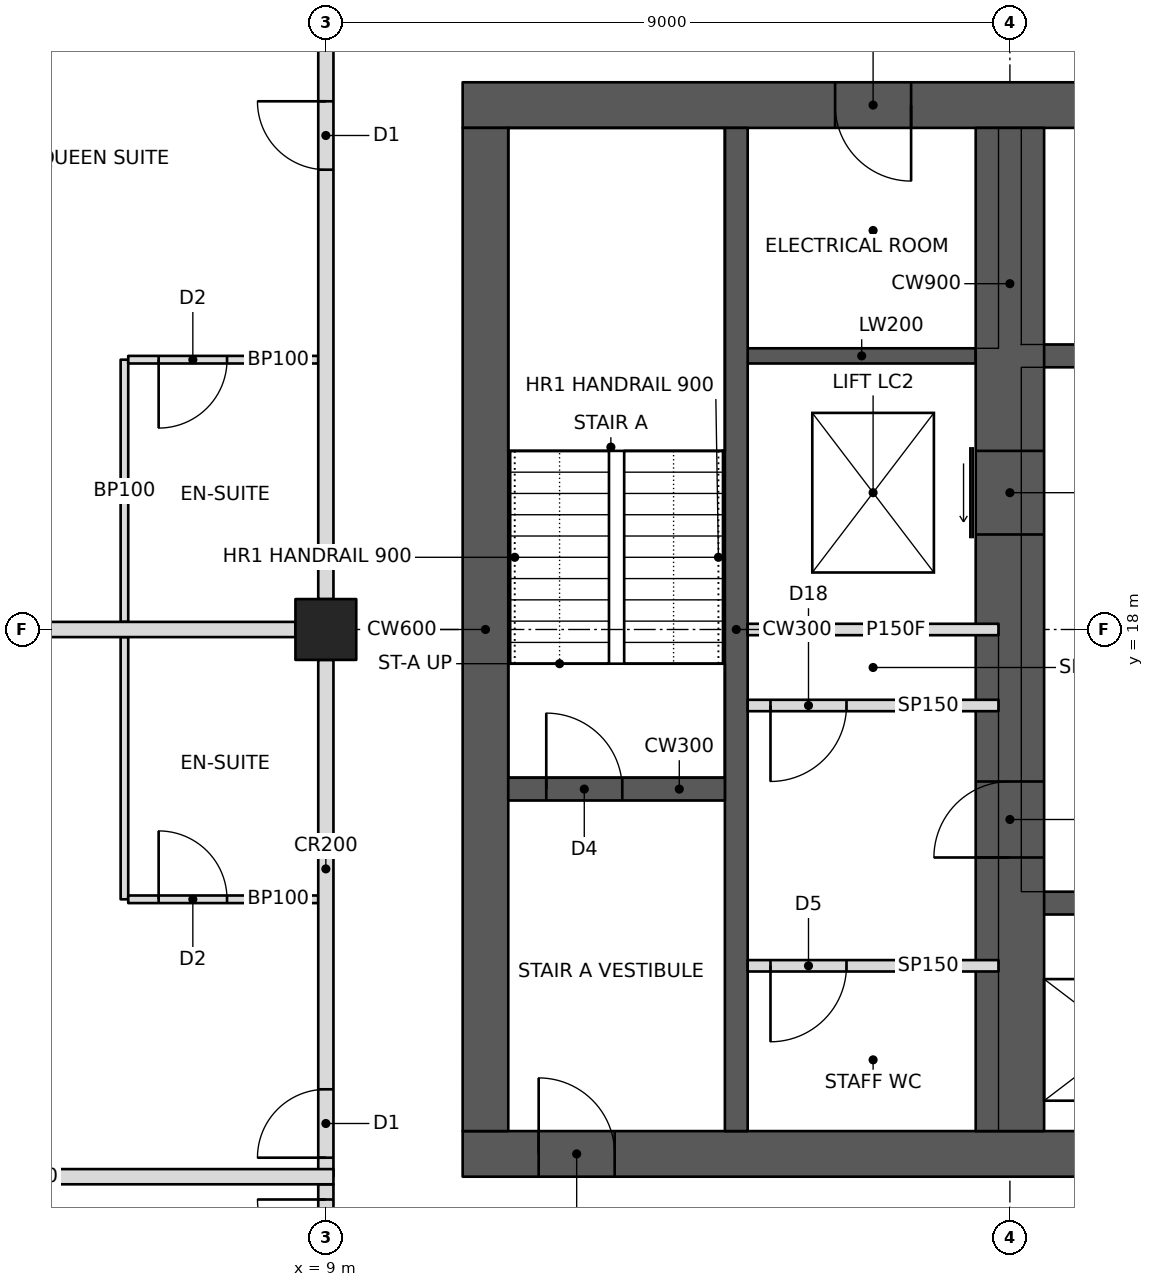
"""IFC4 building model, lengths in metres.
Left out: names, types, materials, properties, quantities, classifications, styles, units other than length and angle.
Written with IfcOpenShell. Run it as: python <this file> out.ifc"""

import sys

from ifc_helpers import new_model, si_unit, direction, frame, frame_2d, origin, origin_2d, place, context, subcontext, project, spatial, rectangle, hollow_rectangle, extrude, element, fill, save


model = new_model("IFC4")
c1 = context("Model", 3, precision=1e-05, world=origin(), true_north=direction((0.0, 1.0)))
c2 = subcontext(c1, "Body", "Model", "MODEL_VIEW")
j1 = project(units=[si_unit("LENGTHUNIT", "METRE"), si_unit("PLANEANGLEUNIT", "RADIAN")], contexts=[c1])
p1 = place(None, origin())
s1 = spatial("IfcSite", under=j1, at=p1, CompositionType="ELEMENT")
p2 = place(p1, origin())
s2 = spatial("IfcBuilding", under=s1, at=p2, CompositionType="ELEMENT")
p3 = place(p2, frame((0.0, 0.0, 226.6)))
s3 = spatial("IfcBuildingStorey", under=s2, at=p3, CompositionType="ELEMENT", Elevation=226.6)
p4 = place(p3, frame((9.0, 18.0, 0.0), z_axis=(0.0, 0.0, 1.0), x_axis=(1.0, 0.0, 0.0)))
e1 = element("IfcColumn", 1, at=p4, inside=s3, PredefinedType="COLUMN", context=c2, shape_type="SweptSolid", body=[
    extrude(hollow_rectangle(XDim=0.8, YDim=0.8, WallThickness=0.1, at=origin_2d()), origin(), (0.0, 0.0, 1.0), 3.6),
])
p5 = place(p3, frame((10.8, 11.1, 0.0), z_axis=(0.0, 0.0, 1.0), x_axis=(1.0, 0.0, 0.0)))
e2 = element("IfcWall", 2, at=p5, inside=s3, PredefinedType="SHEAR", context=c2, shape_type="SweptSolid", body=[
    extrude(rectangle(XDim=23.4, YDim=0.6, at=frame_2d((11.7, 0.0))), origin(), (0.0, 0.0, 1.0), 3.6),
])
p6 = place(p5, frame((1.0, 0.0, 0.0)))
e3 = element("IfcOpeningElement", 3, at=p6, cuts=e2, PredefinedType="OPENING", context=c2, shape_type="SweptSolid", body=[
    extrude(rectangle(XDim=1.0, YDim=2.1, at=frame_2d((0.5, 1.05))), frame((0.0, 0.31, 0.0), z_axis=(0.0, -1.0, 0.0), x_axis=(1.0, 0.0, 0.0)), (0.0, 0.0, 1.0), 0.62),
])
p7 = place(p5, frame((17.2, 0.0, 0.0)))
e4 = element("IfcOpeningElement", 4, at=p7, cuts=e2, PredefinedType="OPENING", context=c2, shape_type="SweptSolid", body=[
    extrude(rectangle(XDim=1.8, YDim=2.1, at=frame_2d((0.9, 1.05))), frame((0.0, 0.31, 0.0), z_axis=(0.0, -1.0, 0.0), x_axis=(1.0, 0.0, 0.0)), (0.0, 0.0, 1.0), 0.62),
])
p8 = place(p3, frame((10.8, 24.9, 0.0), z_axis=(0.0, 0.0, 1.0), x_axis=(1.0, 0.0, 0.0)))
e5 = element("IfcWall", 5, at=p8, inside=s3, PredefinedType="SHEAR", context=c2, shape_type="SweptSolid", body=[
    extrude(rectangle(XDim=23.4, YDim=0.6, at=frame_2d((11.7, 0.0))), origin(), (0.0, 0.0, 1.0), 3.6),
])
p9 = place(p8, frame((17.2, 0.0, 0.0)))
e6 = element("IfcOpeningElement", 6, at=p9, cuts=e5, PredefinedType="OPENING", context=c2, shape_type="SweptSolid", body=[
    extrude(rectangle(XDim=1.8, YDim=2.1, at=frame_2d((0.9, 1.05))), frame((0.0, 0.31, 0.0), z_axis=(0.0, -1.0, 0.0), x_axis=(1.0, 0.0, 0.0)), (0.0, 0.0, 1.0), 0.62),
])
p10 = place(p8, frame((21.1, 0.0, 0.0)))
e7 = element("IfcOpeningElement", 7, at=p10, cuts=e5, PredefinedType="OPENING", context=c2, shape_type="SweptSolid", body=[
    extrude(rectangle(XDim=1.0, YDim=2.1, at=frame_2d((0.5, 1.05))), frame((0.0, 0.31, 0.0), z_axis=(0.0, -1.0, 0.0), x_axis=(1.0, 0.0, 0.0)), (0.0, 0.0, 1.0), 0.62),
])
p11 = place(p8, frame((4.9, 0.0, 0.0)))
e8 = element("IfcOpeningElement", 8, at=p11, cuts=e5, PredefinedType="OPENING", context=c2, shape_type="SweptSolid", body=[
    extrude(rectangle(XDim=1.0, YDim=2.1, at=frame_2d((0.5, 1.05))), frame((0.0, 0.31, 0.0), z_axis=(0.0, -1.0, 0.0), x_axis=(1.0, 0.0, 0.0)), (0.0, 0.0, 1.0), 0.62),
])
p12 = place(p3, frame((11.1, 11.4, 0.0), z_axis=(0.0, 0.0, 1.0), x_axis=(0.0, 1.0, 0.0)))
e9 = element("IfcWall", 9, at=p12, inside=s3, PredefinedType="SHEAR", context=c2, shape_type="SweptSolid", body=[
    extrude(rectangle(XDim=13.2, YDim=0.6, at=frame_2d((6.6, 0.0))), origin(), (0.0, 0.0, 1.0), 3.6),
])
p13 = place(p3, frame((14.4, 11.4, 0.0), z_axis=(0.0, 0.0, 1.0), x_axis=(0.0, 1.0, 0.0)))
e10 = element("IfcWall", 10, at=p13, inside=s3, PredefinedType="SHEAR", context=c2, shape_type="SweptSolid", body=[
    extrude(rectangle(XDim=13.2, YDim=0.3, at=frame_2d((6.6, 0.0))), origin(), (0.0, 0.0, 1.0), 3.6),
])
p14 = place(p3, frame((11.4, 15.9, 0.0), z_axis=(0.0, 0.0, 1.0), x_axis=(1.0, 0.0, 0.0)))
e11 = element("IfcWall", 11, at=p14, inside=s3, PredefinedType="SHEAR", context=c2, shape_type="SweptSolid", body=[
    extrude(rectangle(XDim=2.85, YDim=0.3, at=frame_2d((1.425, 0.0))), origin(), (0.0, 0.0, 1.0), 3.6),
])
p15 = place(p14, frame((0.5, 0.0, 0.0)))
e12 = element("IfcOpeningElement", 12, at=p15, cuts=e11, PredefinedType="OPENING", context=c2, shape_type="SweptSolid", body=[
    extrude(rectangle(XDim=1.0, YDim=2.1, at=frame_2d((0.5, 1.05))), frame((0.0, 0.16, 0.0), z_axis=(0.0, -1.0, 0.0), x_axis=(1.0, 0.0, 0.0)), (0.0, 0.0, 1.0), 0.32),
])
p16 = place(p3, frame((18.0, 11.4, 0.0), z_axis=(0.0, 0.0, 1.0), x_axis=(0.0, 1.0, 0.0)))
e13 = element("IfcWall", 13, at=p16, inside=s3, PredefinedType="SHEAR", context=c2, shape_type="SweptSolid", body=[
    extrude(rectangle(XDim=13.2, YDim=0.9, at=frame_2d((6.6, 0.0))), origin(), (0.0, 0.0, 1.0), 3.6),
])
p17 = place(p16, frame((3.6, 0.0, 0.0)))
e14 = element("IfcOpeningElement", 14, at=p17, cuts=e13, PredefinedType="OPENING", context=c2, shape_type="SweptSolid", body=[
    extrude(rectangle(XDim=1.0, YDim=2.1, at=frame_2d((0.5, 1.05))), frame((0.0, 0.46, 0.0), z_axis=(0.0, -1.0, 0.0), x_axis=(1.0, 0.0, 0.0)), (0.0, 0.0, 1.0), 0.92),
])
p18 = place(p16, frame((7.85, 0.0, 0.0)))
e15 = element("IfcOpeningElement", 15, at=p18, cuts=e13, PredefinedType="OPENING", context=c2, shape_type="SweptSolid", body=[
    extrude(rectangle(XDim=1.1, YDim=2.1, at=frame_2d((0.55, 1.05))), frame((0.0, 0.46, 0.0), z_axis=(0.0, -1.0, 0.0), x_axis=(1.0, 0.0, 0.0)), (0.0, 0.0, 1.0), 0.92),
])
p19 = place(p3, frame((14.55, 18.0, 0.0), z_axis=(0.0, 0.0, 1.0), x_axis=(1.0, 0.0, 0.0)))
e16 = element("IfcWall", 16, at=p19, inside=s3, PredefinedType="PARTITIONING", context=c2, shape_type="SweptSolid", body=[
    extrude(rectangle(XDim=3.3, YDim=0.15, at=frame_2d((1.65, 0.0))), origin(), (0.0, 0.0, 1.0), 3.4),
])
p20 = place(p3, frame((18.15, 14.4, 0.0), z_axis=(0.0, 0.0, 1.0), x_axis=(1.0, 0.0, 0.0)))
e17 = element("IfcWall", 17, at=p20, inside=s3, PredefinedType="SHEAR", context=c2, shape_type="SweptSolid", body=[
    extrude(rectangle(XDim=9.0, YDim=0.3, at=frame_2d((4.5, 0.0))), origin(), (0.0, 0.0, 1.0), 3.6),
])
p21 = place(p20, frame((0.8, 0.0, 0.0)))
e18 = element("IfcOpeningElement", 18, at=p21, cuts=e17, PredefinedType="OPENING", context=c2, shape_type="SweptSolid", body=[
    extrude(rectangle(XDim=1.1, YDim=2.1, at=frame_2d((0.55, 1.05))), frame((0.0, 0.16, 0.0), z_axis=(0.0, -1.0, 0.0), x_axis=(1.0, 0.0, 0.0)), (0.0, 0.0, 1.0), 0.32),
])
p22 = place(p20, frame((6.75, 0.0, 0.0)))
e19 = element("IfcOpeningElement", 19, at=p22, cuts=e17, PredefinedType="OPENING", context=c2, shape_type="SweptSolid", body=[
    extrude(rectangle(XDim=1.2, YDim=2.1, at=frame_2d((0.6, 1.05))), frame((0.0, 0.16, 0.0), z_axis=(0.0, -1.0, 0.0), x_axis=(1.0, 0.0, 0.0)), (0.0, 0.0, 1.0), 0.32),
])
p23 = place(p20, frame((3.8, 0.0, 0.0)))
e20 = element("IfcOpeningElement", 20, at=p23, cuts=e17, PredefinedType="OPENING", context=c2, shape_type="SweptSolid", body=[
    extrude(rectangle(XDim=1.1, YDim=2.1, at=frame_2d((0.55, 1.05))), frame((0.0, 0.16, 0.0), z_axis=(0.0, -1.0, 0.0), x_axis=(1.0, 0.0, 0.0)), (0.0, 0.0, 1.0), 0.32),
])
p24 = place(p3, frame((18.15, 21.6, 0.0), z_axis=(0.0, 0.0, 1.0), x_axis=(1.0, 0.0, 0.0)))
e21 = element("IfcWall", 21, at=p24, inside=s3, PredefinedType="SHEAR", context=c2, shape_type="SweptSolid", body=[
    extrude(rectangle(XDim=9.0, YDim=0.3, at=frame_2d((4.5, 0.0))), origin(), (0.0, 0.0, 1.0), 3.6),
])
p25 = place(p24, frame((6.75, 0.0, 0.0)))
e22 = element("IfcOpeningElement", 22, at=p25, cuts=e21, PredefinedType="OPENING", context=c2, shape_type="SweptSolid", body=[
    extrude(rectangle(XDim=1.2, YDim=2.1, at=frame_2d((0.6, 1.05))), frame((0.0, 0.16, 0.0), z_axis=(0.0, -1.0, 0.0), x_axis=(1.0, 0.0, 0.0)), (0.0, 0.0, 1.0), 0.32),
])
p26 = place(p24, frame((0.8, 0.0, 0.0)))
e23 = element("IfcOpeningElement", 23, at=p26, cuts=e21, PredefinedType="OPENING", context=c2, shape_type="SweptSolid", body=[
    extrude(rectangle(XDim=1.1, YDim=2.1, at=frame_2d((0.55, 1.05))), frame((0.0, 0.16, 0.0), z_axis=(0.0, -1.0, 0.0), x_axis=(1.0, 0.0, 0.0)), (0.0, 0.0, 1.0), 0.32),
])
p27 = place(p24, frame((3.8, 0.0, 0.0)))
e24 = element("IfcOpeningElement", 24, at=p27, cuts=e21, PredefinedType="OPENING", context=c2, shape_type="SweptSolid", body=[
    extrude(rectangle(XDim=1.1, YDim=2.1, at=frame_2d((0.55, 1.05))), frame((0.0, 0.16, 0.0), z_axis=(0.0, -1.0, 0.0), x_axis=(1.0, 0.0, 0.0)), (0.0, 0.0, 1.0), 0.32),
])
p28 = place(p3, frame((14.55, 21.6, 0.0), z_axis=(0.0, 0.0, 1.0), x_axis=(1.0, 0.0, 0.0)))
e25 = element("IfcWall", 25, at=p28, inside=s3, PredefinedType="SHEAR", context=c2, shape_type="SweptSolid", body=[
    extrude(rectangle(XDim=3.0, YDim=0.2, at=frame_2d((1.5, 0.0))), origin(), (0.0, 0.0, 1.0), 3.6),
])
p29 = place(p3, frame((9.0, 10.8, 0.0), z_axis=(0.0, 0.0, 1.0), x_axis=(0.0, 1.0, 0.0)))
e26 = element("IfcWall", 26, at=p29, inside=s3, PredefinedType="PARTITIONING", context=c2, shape_type="SweptSolid", body=[
    extrude(rectangle(XDim=6.8, YDim=0.2, at=frame_2d((3.4, 0.0))), origin(), (0.0, 0.0, 1.0), 2.605),
])
p30 = place(p29, frame((0.25, 0.0, 0.0)))
e27 = element("IfcOpeningElement", 27, at=p30, cuts=e26, PredefinedType="OPENING", context=c2, shape_type="SweptSolid", body=[
    extrude(rectangle(XDim=0.9, YDim=2.1, at=frame_2d((0.45, 1.05))), frame((0.0, 0.11, 0.0), z_axis=(0.0, -1.0, 0.0), x_axis=(1.0, 0.0, 0.0)), (0.0, 0.0, 1.0), 0.22),
])
p31 = place(p3, frame((9.0, 18.4, 0.0), z_axis=(0.0, 0.0, 1.0), x_axis=(0.0, 1.0, 0.0)))
e28 = element("IfcWall", 28, at=p31, inside=s3, PredefinedType="PARTITIONING", context=c2, shape_type="SweptSolid", body=[
    extrude(rectangle(XDim=8.2, YDim=0.2, at=frame_2d((4.1, 0.0))), origin(), (0.0, 0.0, 1.0), 2.605),
])
p32 = place(p31, frame((5.65, 0.0, 0.0)))
e29 = element("IfcOpeningElement", 29, at=p32, cuts=e28, PredefinedType="OPENING", context=c2, shape_type="SweptSolid", body=[
    extrude(rectangle(XDim=0.9, YDim=2.1, at=frame_2d((0.45, 1.05))), frame((0.0, 0.11, 0.0), z_axis=(0.0, -1.0, 0.0), x_axis=(1.0, 0.0, 0.0)), (0.0, 0.0, 1.0), 0.22),
])
p33 = place(p3, frame((1.0, 10.8, 0.0), z_axis=(0.0, 0.0, 1.0), x_axis=(1.0, 0.0, 0.0)))
e30 = element("IfcWall", 30, at=p33, inside=s3, PredefinedType="PARTITIONING", context=c2, shape_type="SweptSolid", body=[
    extrude(rectangle(XDim=8.1, YDim=0.2, at=frame_2d((4.05, 0.0))), origin(), (0.0, 0.0, 1.0), 2.604),
])
p34 = place(p3, frame((8.6, 18.0, 0.0), z_axis=(0.0, 0.0, 1.0), x_axis=(-1.0, 0.0, 0.0)))
e31 = element("IfcWall", 31, at=p34, inside=s3, PredefinedType="PARTITIONING", context=c2, shape_type="SweptSolid", body=[
    extrude(rectangle(XDim=7.6, YDim=0.2, at=frame_2d((3.8, 0.0))), origin(), (0.0, 0.0, 1.0), 2.605),
])
p35 = place(p3, frame((6.35, 14.45, 0.0), z_axis=(0.0, 0.0, 1.0), x_axis=(0.0, 1.0, 0.0)))
e32 = element("IfcWall", 32, at=p35, inside=s3, PredefinedType="PARTITIONING", context=c2, shape_type="SweptSolid", body=[
    extrude(rectangle(XDim=3.45, YDim=0.1, at=frame_2d((1.725, 0.0))), origin(), (0.0, 0.0, 1.0), 2.604),
])
p36 = place(p3, frame((8.9, 14.45, 0.0), z_axis=(0.0, 0.0, 1.0), x_axis=(-1.0, 0.0, 0.0)))
e33 = element("IfcWall", 33, at=p36, inside=s3, PredefinedType="PARTITIONING", context=c2, shape_type="SweptSolid", body=[
    extrude(rectangle(XDim=2.5, YDim=0.1, at=frame_2d((1.25, 0.0))), origin(), (0.0, 0.0, 1.0), 2.604),
])
p37 = place(p36, frame((1.2, 0.0, 0.0)))
e34 = element("IfcOpeningElement", 34, at=p37, cuts=e33, PredefinedType="OPENING", context=c2, shape_type="SweptSolid", body=[
    extrude(rectangle(XDim=0.9, YDim=2.1, at=frame_2d((0.45, 1.05))), frame((0.0, 0.06, 0.0), z_axis=(0.0, -1.0, 0.0), x_axis=(1.0, 0.0, 0.0)), (0.0, 0.0, 1.0), 0.12),
])
p38 = place(p3, frame((6.35, 18.1, 0.0), z_axis=(0.0, 0.0, 1.0), x_axis=(0.0, 1.0, 0.0)))
e35 = element("IfcWall", 35, at=p38, inside=s3, PredefinedType="PARTITIONING", context=c2, shape_type="SweptSolid", body=[
    extrude(rectangle(XDim=3.45, YDim=0.1, at=frame_2d((1.725, 0.0))), origin(), (0.0, 0.0, 1.0), 2.604),
])
p39 = place(p3, frame((8.9, 21.55, 0.0), z_axis=(0.0, 0.0, 1.0), x_axis=(-1.0, 0.0, 0.0)))
e36 = element("IfcWall", 36, at=p39, inside=s3, PredefinedType="PARTITIONING", context=c2, shape_type="SweptSolid", body=[
    extrude(rectangle(XDim=2.5, YDim=0.1, at=frame_2d((1.25, 0.0))), origin(), (0.0, 0.0, 1.0), 2.604),
])
p40 = place(p39, frame((1.2, 0.0, 0.0)))
e37 = element("IfcOpeningElement", 37, at=p40, cuts=e36, PredefinedType="OPENING", context=c2, shape_type="SweptSolid", body=[
    extrude(rectangle(XDim=0.9, YDim=2.1, at=frame_2d((0.45, 1.05))), frame((0.0, 0.06, 0.0), z_axis=(0.0, -1.0, 0.0), x_axis=(1.0, 0.0, 0.0)), (0.0, 0.0, 1.0), 0.12),
])
p41 = place(p3, frame((9.0, 9.4, 0.0), z_axis=(0.0, 0.0, 1.0), x_axis=(0.0, 1.0, 0.0)))
e38 = element("IfcWall", 38, at=p41, inside=s3, PredefinedType="PARTITIONING", context=c2, shape_type="SweptSolid", body=[
    extrude(rectangle(XDim=1.3, YDim=0.2, at=frame_2d((0.65, 0.0))), origin(), (0.0, 0.0, 1.0), 2.605),
])
p42 = place(p41, frame((0.2, 0.0, 0.0)))
e39 = element("IfcOpeningElement", 39, at=p42, cuts=e38, PredefinedType="OPENING", context=c2, shape_type="SweptSolid", body=[
    extrude(rectangle(XDim=0.9, YDim=2.1, at=frame_2d((0.45, 1.05))), frame((0.0, 0.11, 0.0), z_axis=(0.0, -1.0, 0.0), x_axis=(1.0, 0.0, 0.0)), (0.0, 0.0, 1.0), 0.22),
])
p43 = place(p3, frame((14.55, 17.0, 0.0), z_axis=(0.0, 0.0, 1.0), x_axis=(1.0, 0.0, 0.0)))
e40 = element("IfcWall", 40, at=p43, inside=s3, PredefinedType="PARTITIONING", context=c2, shape_type="SweptSolid", body=[
    extrude(rectangle(XDim=3.3, YDim=0.15, at=frame_2d((1.65, 0.0))), origin(), (0.0, 0.0, 1.0), 3.4),
])
p44 = place(p43, frame((0.3, 0.0, 0.0)))
e41 = element("IfcOpeningElement", 41, at=p44, cuts=e40, PredefinedType="OPENING", context=c2, shape_type="SweptSolid", body=[
    extrude(rectangle(XDim=1.0, YDim=2.1, at=frame_2d((0.5, 1.05))), frame((0.0, 0.085, 0.0), z_axis=(0.0, -1.0, 0.0), x_axis=(1.0, 0.0, 0.0)), (0.0, 0.0, 1.0), 0.17),
])
p45 = place(p3, frame((14.55, 13.575, 0.0), z_axis=(0.0, 0.0, 1.0), x_axis=(1.0, 0.0, 0.0)))
e42 = element("IfcWall", 42, at=p45, inside=s3, PredefinedType="PARTITIONING", context=c2, shape_type="SweptSolid", body=[
    extrude(rectangle(XDim=3.3, YDim=0.15, at=frame_2d((1.65, 0.0))), origin(), (0.0, 0.0, 1.0), 3.4),
])
p46 = place(p45, frame((0.3, 0.0, 0.0)))
e43 = element("IfcOpeningElement", 43, at=p46, cuts=e42, PredefinedType="OPENING", context=c2, shape_type="SweptSolid", body=[
    extrude(rectangle(XDim=1.0, YDim=2.1, at=frame_2d((0.5, 1.05))), frame((0.0, 0.085, 0.0), z_axis=(0.0, -1.0, 0.0), x_axis=(1.0, 0.0, 0.0)), (0.0, 0.0, 1.0), 0.17),
])
p47 = place(p37, frame((0.9, 0.0, 0.0), z_axis=(0.0, 0.0, 1.0), x_axis=(-1.0, 0.0, 0.0)))
e44 = element("IfcDoor", 44, at=p47, inside=s3, OperationType="SINGLE_SWING_LEFT", PredefinedType="DOOR", context=c2, shape_type="SweptSolid", body=[
    extrude(rectangle(XDim=0.9, YDim=2.1, at=frame_2d((0.45, 1.05))), frame((0.0, 0.025, 0.0), z_axis=(0.0, -1.0, 0.0), x_axis=(1.0, 0.0, 0.0)), (0.0, 0.0, 1.0), 0.05),
])
fill(e34, e44)
p48 = place(p30, origin())
e45 = element("IfcDoor", 45, at=p48, inside=s3, OperationType="SINGLE_SWING_LEFT", PredefinedType="DOOR", context=c2, shape_type="SweptSolid", body=[
    extrude(rectangle(XDim=0.9, YDim=2.1, at=frame_2d((0.45, 1.05))), frame((0.0, 0.025, 0.0), z_axis=(0.0, -1.0, 0.0), x_axis=(1.0, 0.0, 0.0)), (0.0, 0.0, 1.0), 0.05),
])
fill(e27, e45)
p49 = place(p40, origin())
e46 = element("IfcDoor", 46, at=p49, inside=s3, OperationType="SINGLE_SWING_RIGHT", PredefinedType="DOOR", context=c2, shape_type="SweptSolid", body=[
    extrude(rectangle(XDim=0.9, YDim=2.1, at=frame_2d((0.45, 1.05))), frame((0.0, 0.025, 0.0), z_axis=(0.0, -1.0, 0.0), x_axis=(1.0, 0.0, 0.0)), (0.0, 0.0, 1.0), 0.05),
])
fill(e37, e46)
p50 = place(p32, origin())
e47 = element("IfcDoor", 47, at=p50, inside=s3, OperationType="SINGLE_SWING_RIGHT", PredefinedType="DOOR", context=c2, shape_type="SweptSolid", body=[
    extrude(rectangle(XDim=0.9, YDim=2.1, at=frame_2d((0.45, 1.05))), frame((0.0, 0.025, 0.0), z_axis=(0.0, -1.0, 0.0), x_axis=(1.0, 0.0, 0.0)), (0.0, 0.0, 1.0), 0.05),
])
fill(e29, e47)
p51 = place(p42, origin())
e48 = element("IfcDoor", 48, at=p51, inside=s3, OperationType="SINGLE_SWING_RIGHT", PredefinedType="DOOR", context=c2, shape_type="SweptSolid", body=[
    extrude(rectangle(XDim=0.9, YDim=2.1, at=frame_2d((0.45, 1.05))), frame((0.0, 0.025, 0.0), z_axis=(0.0, -1.0, 0.0), x_axis=(1.0, 0.0, 0.0)), (0.0, 0.0, 1.0), 0.05),
])
fill(e39, e48)
p52 = place(p44, frame((1.0, 0.0, 0.0), z_axis=(0.0, 0.0, 1.0), x_axis=(-1.0, 0.0, 0.0)))
e49 = element("IfcDoor", 49, at=p52, inside=s3, OperationType="SINGLE_SWING_RIGHT", PredefinedType="DOOR", context=c2, shape_type="SweptSolid", body=[
    extrude(rectangle(XDim=1.0, YDim=2.1, at=frame_2d((0.5, 1.05))), frame((0.0, 0.025, 0.0), z_axis=(0.0, -1.0, 0.0), x_axis=(1.0, 0.0, 0.0)), (0.0, 0.0, 1.0), 0.05),
])
fill(e41, e49)
p53 = place(p46, frame((1.0, 0.0, 0.0), z_axis=(0.0, 0.0, 1.0), x_axis=(-1.0, 0.0, 0.0)))
e50 = element("IfcDoor", 50, at=p53, inside=s3, OperationType="SINGLE_SWING_RIGHT", PredefinedType="DOOR", context=c2, shape_type="SweptSolid", body=[
    extrude(rectangle(XDim=1.0, YDim=2.1, at=frame_2d((0.5, 1.05))), frame((0.0, 0.025, 0.0), z_axis=(0.0, -1.0, 0.0), x_axis=(1.0, 0.0, 0.0)), (0.0, 0.0, 1.0), 0.05),
])
fill(e43, e50)
p54 = place(p6, origin())
e51 = element("IfcDoor", 51, at=p54, inside=s3, OperationType="SINGLE_SWING_LEFT", PredefinedType="DOOR", context=c2, shape_type="SweptSolid", body=[
    extrude(rectangle(XDim=1.0, YDim=2.1, at=frame_2d((0.5, 1.05))), frame((0.0, 0.025, 0.0), z_axis=(0.0, -1.0, 0.0), x_axis=(1.0, 0.0, 0.0)), (0.0, 0.0, 1.0), 0.05),
])
fill(e3, e51)
p55 = place(p15, origin())
e52 = element("IfcDoor", 52, at=p55, inside=s3, OperationType="SINGLE_SWING_LEFT", PredefinedType="DOOR", context=c2, shape_type="SweptSolid", body=[
    extrude(rectangle(XDim=1.0, YDim=2.1, at=frame_2d((0.5, 1.05))), frame((0.0, 0.025, 0.0), z_axis=(0.0, -1.0, 0.0), x_axis=(1.0, 0.0, 0.0)), (0.0, 0.0, 1.0), 0.05),
])
fill(e12, e52)
p56 = place(p17, origin())
e53 = element("IfcDoor", 53, at=p56, inside=s3, OperationType="SINGLE_SWING_LEFT", PredefinedType="DOOR", context=c2, shape_type="SweptSolid", body=[
    extrude(rectangle(XDim=1.0, YDim=2.1, at=frame_2d((0.5, 1.05))), frame((0.0, 0.025, 0.0), z_axis=(0.0, -1.0, 0.0), x_axis=(1.0, 0.0, 0.0)), (0.0, 0.0, 1.0), 0.05),
])
fill(e14, e53)
p57 = place(p11, frame((1.0, 0.0, 0.0), z_axis=(0.0, 0.0, 1.0), x_axis=(-1.0, 0.0, 0.0)))
e54 = element("IfcDoor", 54, at=p57, inside=s3, OperationType="SINGLE_SWING_LEFT", PredefinedType="DOOR", context=c2, shape_type="SweptSolid", body=[
    extrude(rectangle(XDim=1.0, YDim=2.1, at=frame_2d((0.5, 1.05))), frame((0.0, 0.025, 0.0), z_axis=(0.0, -1.0, 0.0), x_axis=(1.0, 0.0, 0.0)), (0.0, 0.0, 1.0), 0.05),
])
fill(e8, e54)
p58 = place(p18, origin())
e55 = element("IfcDoor", 55, at=p58, inside=s3, OperationType="SLIDING_TO_LEFT", PredefinedType="DOOR", context=c2, shape_type="SweptSolid", body=[
    extrude(rectangle(XDim=1.1, YDim=2.1, at=frame_2d((0.55, 1.05))), frame((0.0, 0.025, 0.0), z_axis=(0.0, -1.0, 0.0), x_axis=(1.0, 0.0, 0.0)), (0.0, 0.0, 1.0), 0.05),
])
fill(e15, e55)
save(model, sys.argv[1])
